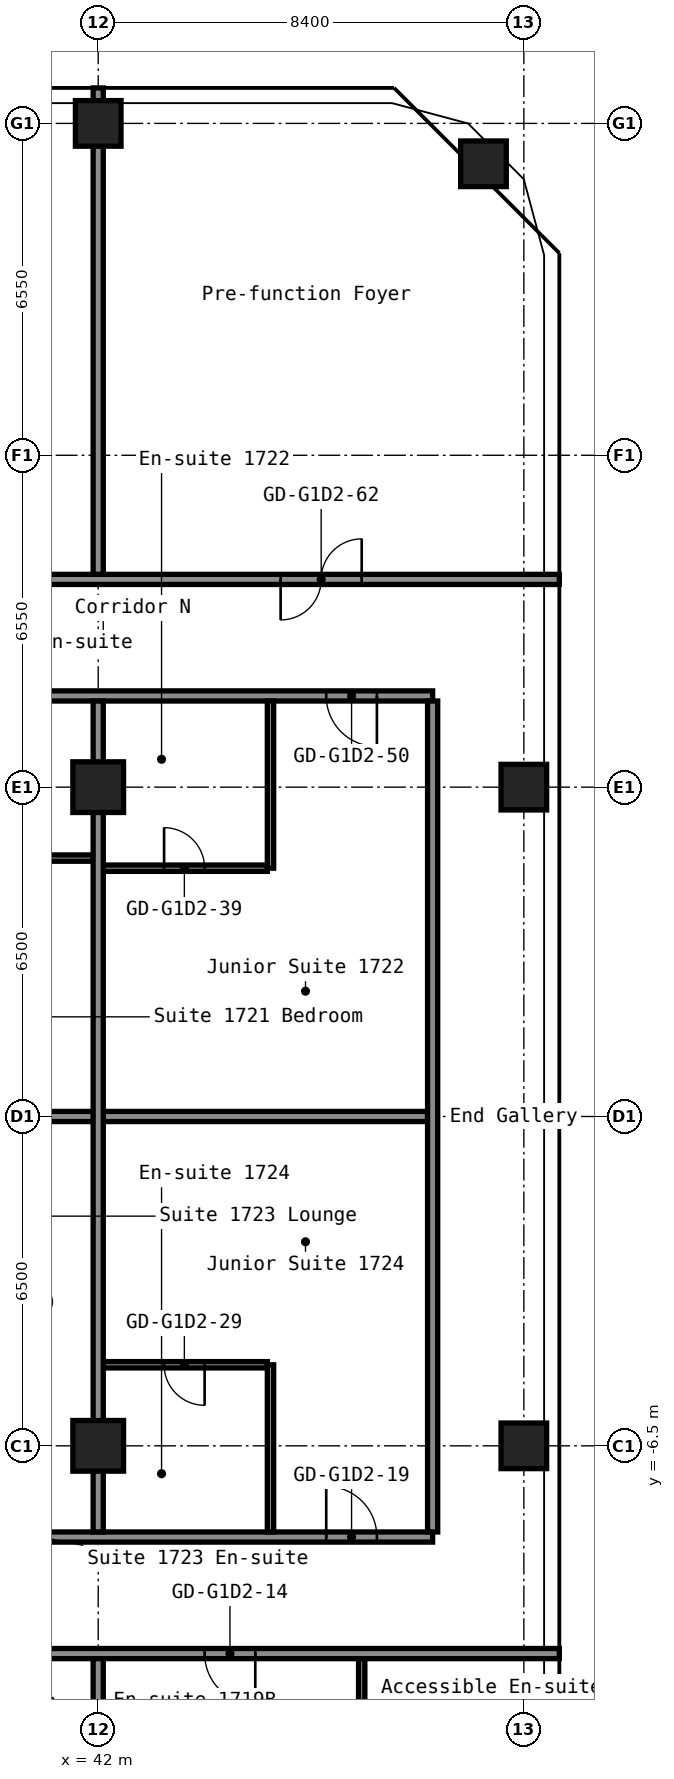
"""IFC4 building model, lengths in metres.
Left out: names, types, materials, properties, quantities, classifications, styles, units other than length and angle.
Written with IfcOpenShell. Run it as: python <this file> out.ifc"""

import sys

from ifc_helpers import new_model, si_unit, direction, frame, frame_2d, origin, origin_2d, place, context, subcontext, project, spatial, rectangle, hollow_rectangle, extrude, element, fill, save


model = new_model("IFC4")
c1 = context("Model", 3, precision=1e-05, world=origin(), true_north=direction((0.0, 1.0)))
c2 = subcontext(c1, "Body", "Model", "MODEL_VIEW")
j1 = project(units=[si_unit("LENGTHUNIT", "METRE"), si_unit("PLANEANGLEUNIT", "RADIAN")], contexts=[c1])
p1 = place(None, origin())
s1 = spatial("IfcSite", under=j1, at=p1, CompositionType="ELEMENT")
p2 = place(p1, origin())
s2 = spatial("IfcBuilding", under=s1, at=p2, CompositionType="ELEMENT")
p3 = place(p2, frame((0.0, 0.0, 61.4)))
s3 = spatial("IfcBuildingStorey", under=s2, at=p3, CompositionType="ELEMENT", Elevation=61.4)
for number, where, z_axis, x_axis in (
    (1, (42.0, -6.5, 0.0), (0.0, 0.0, 1.0), (1.0, 0.0, 0.0)),
    (2, (42.0, 6.5, 0.0), (0.0, 0.0, 1.0), (1.0, 0.0, 0.0)),
):
    element("IfcColumn", number, at=place(p3, frame(where, z_axis=z_axis, x_axis=x_axis)), inside=s3, PredefinedType="COLUMN", context=c2, shape_type="SweptSolid", body=[
        extrude(hollow_rectangle(XDim=1.0, YDim=1.0, WallThickness=0.04, at=origin_2d()), origin(), (0.0, 0.0, 1.0), 2.9),
    ])
for number, where, z_axis, x_axis in (
    (3, (42.0, 19.6, 0.0), (0.0, 0.0, 1.0), (1.0, 0.0, 0.0)),
    (4, (50.4, -6.5, 0.0), (0.0, 0.0, 1.0), (1.0, 0.0, 0.0)),
    (5, (50.4, 6.5, 0.0), (0.0, 0.0, 1.0), (1.0, 0.0, 0.0)),
    (6, (49.603, 18.803, 0.0), (0.0, 0.0, 1.0), (1.0, 0.0, 0.0)),
):
    element("IfcColumn", number, at=place(p3, frame(where, z_axis=z_axis, x_axis=x_axis)), inside=s3, PredefinedType="COLUMN", context=c2, shape_type="SweptSolid", body=[
        extrude(hollow_rectangle(XDim=0.9, YDim=0.9, WallThickness=0.036, at=origin_2d()), origin(), (0.0, 0.0, 1.0), 2.9),
    ])
p4 = place(p3, frame((16.8, -10.6, 0.0), z_axis=(0.0, 0.0, 1.0), x_axis=(1.0, 0.0, 0.0)))
e7 = element("IfcWall", 7, at=p4, inside=s3, PredefinedType="PARTITIONING", context=c2, shape_type="SweptSolid", body=[
    extrude(rectangle(XDim=34.3, YDim=0.2, at=frame_2d((17.15, 0.0))), origin(), (0.0, 0.0, 1.0), 2.9),
])
p5 = place(p4, frame((2.85, 0.0, 0.0)))
e8 = element("IfcOpeningElement", 8, at=p5, cuts=e7, PredefinedType="OPENING", context=c2, shape_type="SweptSolid", body=[
    extrude(rectangle(XDim=1.0, YDim=2.1, at=frame_2d((0.5, 1.05))), frame((0.0, 0.11, 0.0), z_axis=(0.0, -1.0, 0.0), x_axis=(1.0, 0.0, 0.0)), (0.0, 0.0, 1.0), 0.22),
])
p6 = place(p4, frame((4.55, 0.0, 0.0)))
e9 = element("IfcOpeningElement", 9, at=p6, cuts=e7, PredefinedType="OPENING", context=c2, shape_type="SweptSolid", body=[
    extrude(rectangle(XDim=1.0, YDim=2.1, at=frame_2d((0.5, 1.05))), frame((0.0, 0.11, 0.0), z_axis=(0.0, -1.0, 0.0), x_axis=(1.0, 0.0, 0.0)), (0.0, 0.0, 1.0), 0.22),
])
p7 = place(p4, frame((13.9, 0.0, 0.0)))
e10 = element("IfcOpeningElement", 10, at=p7, cuts=e7, PredefinedType="OPENING", context=c2, shape_type="SweptSolid", body=[
    extrude(rectangle(XDim=1.0, YDim=2.1, at=frame_2d((0.5, 1.05))), frame((0.0, 0.11, 0.0), z_axis=(0.0, -1.0, 0.0), x_axis=(1.0, 0.0, 0.0)), (0.0, 0.0, 1.0), 0.22),
])
p8 = place(p4, frame((19.65, 0.0, 0.0)))
e11 = element("IfcOpeningElement", 11, at=p8, cuts=e7, PredefinedType="OPENING", context=c2, shape_type="SweptSolid", body=[
    extrude(rectangle(XDim=1.0, YDim=2.1, at=frame_2d((0.5, 1.05))), frame((0.0, 0.11, 0.0), z_axis=(0.0, -1.0, 0.0), x_axis=(1.0, 0.0, 0.0)), (0.0, 0.0, 1.0), 0.22),
])
p9 = place(p4, frame((21.35, 0.0, 0.0)))
e12 = element("IfcOpeningElement", 12, at=p9, cuts=e7, PredefinedType="OPENING", context=c2, shape_type="SweptSolid", body=[
    extrude(rectangle(XDim=1.0, YDim=2.1, at=frame_2d((0.5, 1.05))), frame((0.0, 0.11, 0.0), z_axis=(0.0, -1.0, 0.0), x_axis=(1.0, 0.0, 0.0)), (0.0, 0.0, 1.0), 0.22),
])
p10 = place(p4, frame((27.3, 0.0, 0.0)))
e13 = element("IfcOpeningElement", 13, at=p10, cuts=e7, PredefinedType="OPENING", context=c2, shape_type="SweptSolid", body=[
    extrude(rectangle(XDim=1.0, YDim=2.1, at=frame_2d((0.5, 1.05))), frame((0.0, 0.11, 0.0), z_axis=(0.0, -1.0, 0.0), x_axis=(1.0, 0.0, 0.0)), (0.0, 0.0, 1.0), 0.22),
])
p11 = place(p3, frame((33.6, -8.3, 0.0), z_axis=(0.0, 0.0, 1.0), x_axis=(1.0, 0.0, 0.0)))
e14 = element("IfcWall", 14, at=p11, inside=s3, PredefinedType="PARTITIONING", context=c2, shape_type="SweptSolid", body=[
    extrude(rectangle(XDim=15.0, YDim=0.2, at=frame_2d((7.5, 0.0))), origin(), (0.0, 0.0, 1.0), 2.9),
])
p12 = place(p11, frame((5.8, 0.0, 0.0)))
e15 = element("IfcOpeningElement", 15, at=p12, cuts=e14, PredefinedType="OPENING", context=c2, shape_type="SweptSolid", body=[
    extrude(rectangle(XDim=1.0, YDim=2.1, at=frame_2d((0.5, 1.05))), frame((0.0, 0.11, 0.0), z_axis=(0.0, -1.0, 0.0), x_axis=(1.0, 0.0, 0.0)), (0.0, 0.0, 1.0), 0.22),
])
p13 = place(p11, frame((12.9, 0.0, 0.0)))
e16 = element("IfcOpeningElement", 16, at=p13, cuts=e14, PredefinedType="OPENING", context=c2, shape_type="SweptSolid", body=[
    extrude(rectangle(XDim=1.0, YDim=2.1, at=frame_2d((0.5, 1.05))), frame((0.0, 0.11, 0.0), z_axis=(0.0, -1.0, 0.0), x_axis=(1.0, 0.0, 0.0)), (0.0, 0.0, 1.0), 0.22),
])
p14 = place(p3, frame((42.1, -4.9, 0.0), z_axis=(0.0, 0.0, 1.0), x_axis=(1.0, 0.0, 0.0)))
e17 = element("IfcWall", 17, at=p14, inside=s3, PredefinedType="PARTITIONING", context=c2, shape_type="SweptSolid", body=[
    extrude(rectangle(XDim=3.237, YDim=0.125, at=frame_2d((1.619, 0.0))), origin(), (0.0, 0.0, 1.0), 2.9),
])
p15 = place(p14, frame((1.2, 0.0, 0.0)))
e18 = element("IfcOpeningElement", 18, at=p15, cuts=e17, PredefinedType="OPENING", context=c2, shape_type="SweptSolid", body=[
    extrude(rectangle(XDim=0.8, YDim=2.1, at=frame_2d((0.4, 1.05))), frame((0.0, 0.073, 0.0), z_axis=(0.0, -1.0, 0.0), x_axis=(1.0, 0.0, 0.0)), (0.0, 0.0, 1.0), 0.145),
])
p16 = place(p3, frame((33.6, 0.0, 0.0), z_axis=(0.0, 0.0, 1.0), x_axis=(1.0, 0.0, 0.0)))
e19 = element("IfcWall", 19, at=p16, inside=s3, PredefinedType="PARTITIONING", context=c2, shape_type="SweptSolid", body=[
    extrude(rectangle(XDim=14.9, YDim=0.2, at=frame_2d((7.45, 0.0))), origin(), (0.0, 0.0, 1.0), 2.9),
])
p17 = place(p3, frame((42.1, 4.9, 0.0), z_axis=(0.0, 0.0, 1.0), x_axis=(1.0, 0.0, 0.0)))
e20 = element("IfcWall", 20, at=p17, inside=s3, PredefinedType="PARTITIONING", context=c2, shape_type="SweptSolid", body=[
    extrude(rectangle(XDim=3.237, YDim=0.125, at=frame_2d((1.619, 0.0))), origin(), (0.0, 0.0, 1.0), 2.9),
])
p18 = place(p17, frame((1.2, 0.0, 0.0)))
e21 = element("IfcOpeningElement", 21, at=p18, cuts=e20, PredefinedType="OPENING", context=c2, shape_type="SweptSolid", body=[
    extrude(rectangle(XDim=0.8, YDim=2.1, at=frame_2d((0.4, 1.05))), frame((0.0, 0.073, 0.0), z_axis=(0.0, -1.0, 0.0), x_axis=(1.0, 0.0, 0.0)), (0.0, 0.0, 1.0), 0.145),
])
p19 = place(p3, frame((39.062, 5.1, 0.0), z_axis=(0.0, 0.0, 1.0), x_axis=(1.0, 0.0, 0.0)))
e22 = element("IfcWall", 22, at=p19, inside=s3, PredefinedType="PARTITIONING", context=c2, shape_type="SweptSolid", body=[
    extrude(rectangle(XDim=2.837, YDim=0.125, at=frame_2d((1.419, 0.0))), origin(), (0.0, 0.0, 1.0), 2.9),
])
p20 = place(p19, frame((1.038, 0.0, 0.0)))
e23 = element("IfcOpeningElement", 23, at=p20, cuts=e22, PredefinedType="OPENING", context=c2, shape_type="SweptSolid", body=[
    extrude(rectangle(XDim=0.8, YDim=2.1, at=frame_2d((0.4, 1.05))), frame((0.0, 0.073, 0.0), z_axis=(0.0, -1.0, 0.0), x_axis=(1.0, 0.0, 0.0)), (0.0, 0.0, 1.0), 0.145),
])
p21 = place(p3, frame((33.6, 8.3, 0.0), z_axis=(0.0, 0.0, 1.0), x_axis=(1.0, 0.0, 0.0)))
e24 = element("IfcWall", 24, at=p21, inside=s3, PredefinedType="PARTITIONING", context=c2, shape_type="SweptSolid", body=[
    extrude(rectangle(XDim=15.0, YDim=0.2, at=frame_2d((7.5, 0.0))), origin(), (0.0, 0.0, 1.0), 2.9),
])
p22 = place(p21, frame((1.6, 0.0, 0.0)))
e25 = element("IfcOpeningElement", 25, at=p22, cuts=e24, PredefinedType="OPENING", context=c2, shape_type="SweptSolid", body=[
    extrude(rectangle(XDim=1.0, YDim=2.1, at=frame_2d((0.5, 1.05))), frame((0.0, 0.11, 0.0), z_axis=(0.0, -1.0, 0.0), x_axis=(1.0, 0.0, 0.0)), (0.0, 0.0, 1.0), 0.22),
])
p23 = place(p21, frame((12.9, 0.0, 0.0)))
e26 = element("IfcOpeningElement", 26, at=p23, cuts=e24, PredefinedType="OPENING", context=c2, shape_type="SweptSolid", body=[
    extrude(rectangle(XDim=1.0, YDim=2.1, at=frame_2d((0.5, 1.05))), frame((0.0, 0.11, 0.0), z_axis=(0.0, -1.0, 0.0), x_axis=(1.0, 0.0, 0.0)), (0.0, 0.0, 1.0), 0.22),
])
p24 = place(p3, frame((16.8, 10.6, 0.0), z_axis=(0.0, 0.0, 1.0), x_axis=(1.0, 0.0, 0.0)))
e27 = element("IfcWall", 27, at=p24, inside=s3, PredefinedType="PARTITIONING", context=c2, shape_type="SweptSolid", body=[
    extrude(rectangle(XDim=34.3, YDim=0.2, at=frame_2d((17.15, 0.0))), origin(), (0.0, 0.0, 1.0), 2.9),
])
p25 = place(p24, frame((3.4, 0.0, 0.0)))
e28 = element("IfcOpeningElement", 28, at=p25, cuts=e27, PredefinedType="OPENING", context=c2, shape_type="SweptSolid", body=[
    extrude(rectangle(XDim=1.6, YDim=2.1, at=frame_2d((0.8, 1.05))), frame((0.0, 0.11, 0.0), z_axis=(0.0, -1.0, 0.0), x_axis=(1.0, 0.0, 0.0)), (0.0, 0.0, 1.0), 0.22),
])
p26 = place(p24, frame((11.8, 0.0, 0.0)))
e29 = element("IfcOpeningElement", 29, at=p26, cuts=e27, PredefinedType="OPENING", context=c2, shape_type="SweptSolid", body=[
    extrude(rectangle(XDim=1.6, YDim=2.1, at=frame_2d((0.8, 1.05))), frame((0.0, 0.11, 0.0), z_axis=(0.0, -1.0, 0.0), x_axis=(1.0, 0.0, 0.0)), (0.0, 0.0, 1.0), 0.22),
])
p27 = place(p24, frame((20.2, 0.0, 0.0)))
e30 = element("IfcOpeningElement", 30, at=p27, cuts=e27, PredefinedType="OPENING", context=c2, shape_type="SweptSolid", body=[
    extrude(rectangle(XDim=1.6, YDim=2.1, at=frame_2d((0.8, 1.05))), frame((0.0, 0.11, 0.0), z_axis=(0.0, -1.0, 0.0), x_axis=(1.0, 0.0, 0.0)), (0.0, 0.0, 1.0), 0.22),
])
p28 = place(p24, frame((28.8, 0.0, 0.0)))
e31 = element("IfcOpeningElement", 31, at=p28, cuts=e27, PredefinedType="OPENING", context=c2, shape_type="SweptSolid", body=[
    extrude(rectangle(XDim=1.6, YDim=2.1, at=frame_2d((0.8, 1.05))), frame((0.0, 0.11, 0.0), z_axis=(0.0, -1.0, 0.0), x_axis=(1.0, 0.0, 0.0)), (0.0, 0.0, 1.0), 0.22),
])
p29 = place(p3, frame((42.0, -20.3, 0.0), z_axis=(0.0, 0.0, 1.0), x_axis=(0.0, 1.0, 0.0)))
e32 = element("IfcWall", 32, at=p29, inside=s3, PredefinedType="PARTITIONING", context=c2, shape_type="SweptSolid", body=[
    extrude(rectangle(XDim=9.6, YDim=0.2, at=frame_2d((4.8, 0.0))), origin(), (0.0, 0.0, 1.0), 2.9),
])
p30 = place(p3, frame((42.0, -8.2, 0.0), z_axis=(0.0, 0.0, 1.0), x_axis=(0.0, 1.0, 0.0)))
e33 = element("IfcWall", 33, at=p30, inside=s3, PredefinedType="PARTITIONING", context=c2, shape_type="SweptSolid", body=[
    extrude(rectangle(XDim=16.4, YDim=0.2, at=frame_2d((8.2, 0.0))), origin(), (0.0, 0.0, 1.0), 2.9),
])
p31 = place(p3, frame((42.0, 10.7, 0.0), z_axis=(0.0, 0.0, 1.0), x_axis=(0.0, 1.0, 0.0)))
e34 = element("IfcWall", 34, at=p31, inside=s3, PredefinedType="PARTITIONING", context=c2, shape_type="SweptSolid", body=[
    extrude(rectangle(XDim=9.6, YDim=0.2, at=frame_2d((4.8, 0.0))), origin(), (0.0, 0.0, 1.0), 2.9),
])
for number, where, z_axis, x_axis in (
    (35, (45.4, -8.2, 0.0), (0.0, 0.0, 1.0), (0.0, 1.0, 0.0)),
    (36, (45.4, 4.9, 0.0), (0.0, 0.0, 1.0), (0.0, 1.0, 0.0)),
):
    element("IfcWall", number, at=place(p3, frame(where, z_axis=z_axis, x_axis=x_axis)), inside=s3, PredefinedType="PARTITIONING", context=c2, shape_type="SweptSolid", body=[
        extrude(rectangle(XDim=3.3, YDim=0.125, at=frame_2d((1.65, 0.0))), origin(), (0.0, 0.0, 1.0), 2.9),
    ])
p32 = place(p3, frame((47.2, -14.0, 0.0), z_axis=(0.0, 0.0, 1.0), x_axis=(0.0, 1.0, 0.0)))
e37 = element("IfcWall", 37, at=p32, inside=s3, PredefinedType="PARTITIONING", context=c2, shape_type="SweptSolid", body=[
    extrude(rectangle(XDim=3.3, YDim=0.125, at=frame_2d((1.65, 0.0))), origin(), (0.0, 0.0, 1.0), 2.9),
])
p33 = place(p32, frame((1.2, 0.0, 0.0)))
e38 = element("IfcOpeningElement", 38, at=p33, cuts=e37, PredefinedType="OPENING", context=c2, shape_type="SweptSolid", body=[
    extrude(rectangle(XDim=1.0, YDim=2.1, at=frame_2d((0.5, 1.05))), frame((0.0, 0.073, 0.0), z_axis=(0.0, -1.0, 0.0), x_axis=(1.0, 0.0, 0.0)), (0.0, 0.0, 1.0), 0.145),
])
p34 = place(p3, frame((48.6, -8.2, 0.0), z_axis=(0.0, 0.0, 1.0), x_axis=(0.0, 1.0, 0.0)))
e39 = element("IfcWall", 39, at=p34, inside=s3, PredefinedType="PARTITIONING", context=c2, shape_type="SweptSolid", body=[
    extrude(rectangle(XDim=16.4, YDim=0.2, at=frame_2d((8.2, 0.0))), origin(), (0.0, 0.0, 1.0), 2.9),
])
p35 = place(p10, origin())
e40 = element("IfcDoor", 40, at=p35, inside=s3, OperationType="SINGLE_SWING_RIGHT", PredefinedType="DOOR", context=c2, shape_type="SweptSolid", body=[
    extrude(rectangle(XDim=1.0, YDim=2.1, at=frame_2d((0.5, 1.05))), frame((0.0, 0.025, 0.0), z_axis=(0.0, -1.0, 0.0), x_axis=(1.0, 0.0, 0.0)), (0.0, 0.0, 1.0), 0.05),
])
fill(e13, e40)
p36 = place(p13, origin())
e41 = element("IfcDoor", 41, at=p36, inside=s3, OperationType="SINGLE_SWING_RIGHT", PredefinedType="DOOR", context=c2, shape_type="SweptSolid", body=[
    extrude(rectangle(XDim=1.0, YDim=2.1, at=frame_2d((0.5, 1.05))), frame((0.0, 0.025, 0.0), z_axis=(0.0, -1.0, 0.0), x_axis=(1.0, 0.0, 0.0)), (0.0, 0.0, 1.0), 0.05),
])
fill(e16, e41)
p37 = place(p15, origin())
e42 = element("IfcDoor", 42, at=p37, inside=s3, OperationType="SINGLE_SWING_RIGHT", PredefinedType="DOOR", context=c2, shape_type="SweptSolid", body=[
    extrude(rectangle(XDim=0.8, YDim=2.1, at=frame_2d((0.4, 1.05))), frame((0.0, 0.025, 0.0), z_axis=(0.0, -1.0, 0.0), x_axis=(1.0, 0.0, 0.0)), (0.0, 0.0, 1.0), 0.05),
])
fill(e18, e42)
p38 = place(p18, origin())
e43 = element("IfcDoor", 43, at=p38, inside=s3, OperationType="SINGLE_SWING_RIGHT", PredefinedType="DOOR", context=c2, shape_type="SweptSolid", body=[
    extrude(rectangle(XDim=0.8, YDim=2.1, at=frame_2d((0.4, 1.05))), frame((0.0, 0.025, 0.0), z_axis=(0.0, -1.0, 0.0), x_axis=(1.0, 0.0, 0.0)), (0.0, 0.0, 1.0), 0.05),
])
fill(e21, e43)
p39 = place(p23, origin())
e44 = element("IfcDoor", 44, at=p39, inside=s3, OperationType="SINGLE_SWING_RIGHT", PredefinedType="DOOR", context=c2, shape_type="SweptSolid", body=[
    extrude(rectangle(XDim=1.0, YDim=2.1, at=frame_2d((0.5, 1.05))), frame((0.0, 0.025, 0.0), z_axis=(0.0, -1.0, 0.0), x_axis=(1.0, 0.0, 0.0)), (0.0, 0.0, 1.0), 0.05),
])
fill(e26, e44)
p40 = place(p28, origin())
e45 = element("IfcDoor", 45, at=p40, inside=s3, OperationType="DOUBLE_DOOR_SINGLE_SWING", PredefinedType="DOOR", context=c2, shape_type="SweptSolid", body=[
    extrude(rectangle(XDim=1.6, YDim=2.1, at=frame_2d((0.8, 1.05))), frame((0.0, 0.025, 0.0), z_axis=(0.0, -1.0, 0.0), x_axis=(1.0, 0.0, 0.0)), (0.0, 0.0, 1.0), 0.05),
])
fill(e31, e45)
save(model, sys.argv[1])
